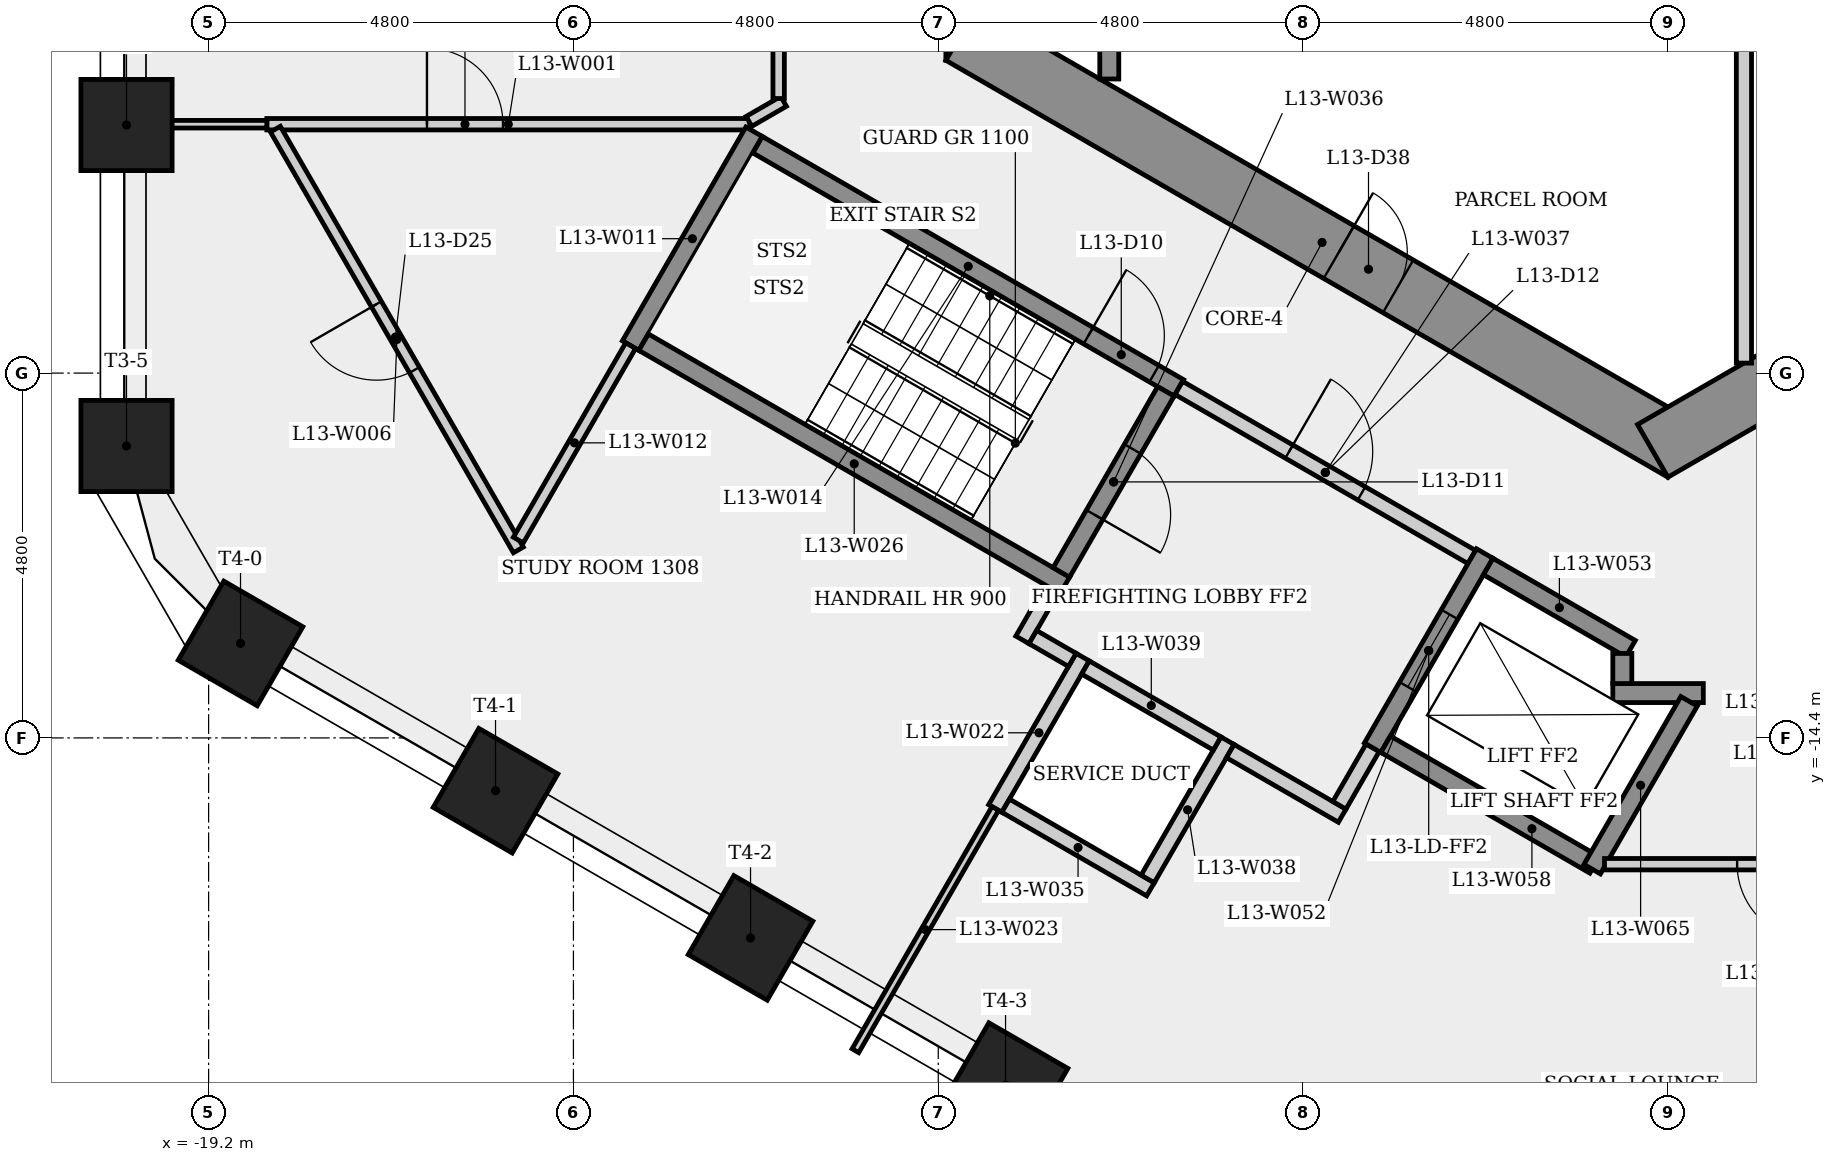
"""IFC4 building model, lengths in metres.
Left out: names, types, materials, properties, quantities, classifications, styles, units other than length and angle.
Written with IfcOpenShell. Run it as: python <this file> out.ifc"""

import sys

from ifc_helpers import new_model, si_unit, direction, frame, frame_2d, origin, origin_2d, place, context, subcontext, project, spatial, rectangle, extrude, element, fill, save


model = new_model("IFC4")
c1 = context("Model", 3, precision=1e-05, world=origin(), true_north=direction((0.0, 1.0)))
c2 = subcontext(c1, "Body", "Model", "MODEL_VIEW")
j1 = project(units=[si_unit("LENGTHUNIT", "METRE"), si_unit("PLANEANGLEUNIT", "RADIAN")], contexts=[c1])
p1 = place(None, origin())
s1 = spatial("IfcSite", under=j1, at=p1, CompositionType="ELEMENT")
p2 = place(p1, origin())
s2 = spatial("IfcBuilding", under=s1, at=p2, CompositionType="ELEMENT")
p3 = place(p2, frame((0.0, 0.0, 52.7)))
s3 = spatial("IfcBuildingStorey", under=s2, at=p3, CompositionType="ELEMENT", Elevation=52.7)
p4 = place(p3, frame((-9.1, 5.485, 0.0), z_axis=(0.0, 0.0, 1.0), x_axis=(0.0, -1.0, 0.0)))
e1 = element("IfcWall", 1, at=p4, inside=s3, PredefinedType="SHEAR", context=c2, shape_type="SweptSolid", body=[
    extrude(rectangle(XDim=10.97, YDim=0.8, at=frame_2d((5.485, 0.0))), origin(), (0.0, 0.0, 1.0), 3.4),
])
p5 = place(p4, frame((4.685, 0.0, 0.0)))
e2 = element("IfcOpeningElement", 2, at=p5, cuts=e1, PredefinedType="OPENING", context=c2, shape_type="SweptSolid", body=[
    extrude(rectangle(XDim=1.6, YDim=2.1, at=frame_2d((0.8, 1.05))), frame((0.0, 0.41, 0.0), z_axis=(0.0, -1.0, 0.0), x_axis=(1.0, 0.0, 0.0)), (0.0, 0.0, 1.0), 0.82),
])
p6 = place(p3, frame((-9.3, -5.138, 0.0), z_axis=(0.0, 0.0, 1.0), x_axis=(0.866023993627, -0.500002442456, 0.0)))
e3 = element("IfcWall", 3, at=p6, inside=s3, PredefinedType="SHEAR", context=c2, shape_type="SweptSolid", body=[
    extrude(rectangle(XDim=10.97, YDim=0.8, at=frame_2d((5.485, 0.0))), origin(), (0.0, 0.0, 1.0), 3.4),
])
p7 = place(p6, frame((5.74, 0.0, 0.0)))
e4 = element("IfcOpeningElement", 4, at=p7, cuts=e3, PredefinedType="OPENING", context=c2, shape_type="SweptSolid", body=[
    extrude(rectangle(XDim=0.9, YDim=2.1, at=frame_2d((0.45, 1.05))), frame((0.0, 0.41, 0.0), z_axis=(0.0, -1.0, 0.0), x_axis=(1.0, 0.0, 0.0)), (0.0, 0.0, 1.0), 0.82),
])
p8 = place(p3, frame((-0.2, -10.623, 0.0), z_axis=(0.0, 0.0, 1.0), x_axis=(0.866023993627, 0.500002442456, 0.0)))
e5 = element("IfcWall", 5, at=p8, inside=s3, PredefinedType="SHEAR", context=c2, shape_type="SweptSolid", body=[
    extrude(rectangle(XDim=10.97, YDim=0.8, at=frame_2d((5.485, 0.0))), origin(), (0.0, 0.0, 1.0), 3.4),
])
p9 = place(p8, frame((7.224, 0.0, 0.0)))
e6 = element("IfcOpeningElement", 6, at=p9, cuts=e5, PredefinedType="OPENING", context=c2, shape_type="SweptSolid", body=[
    extrude(rectangle(XDim=0.9, YDim=2.1, at=frame_2d((0.45, 1.05))), frame((0.0, 0.41, 0.0), z_axis=(0.0, -1.0, 0.0), x_axis=(1.0, 0.0, 0.0)), (0.0, 0.0, 1.0), 0.82),
])
for number, where, z_axis, x_axis in (
    (7, (-20.28, -6.335, 0.0), (0.0, 0.0, 1.0), (-1.0, 0.0, 0.0)),
    (8, (-20.28, -10.559, 0.0), (0.0, 0.0, 1.0), (-1.0, 0.0, 0.0)),
    (9, (-18.78, -13.157, 0.0), (0.0, 0.0, 1.0), (-0.5, -0.866, 0.0)),
    (10, (-15.425, -15.094, 0.0), (0.0, 0.0, 1.0), (-0.5, -0.866, 0.0)),
    (11, (-12.07, -17.031, 0.0), (0.0, 0.0, 1.0), (-0.5, -0.866, 0.0)),
    (12, (-8.715, -18.969, 0.0), (0.0, 0.0, 1.0), (-0.5, -0.866, 0.0)),
):
    element("IfcColumn", number, at=place(p3, frame(where, z_axis=z_axis, x_axis=x_axis)), inside=s3, PredefinedType="COLUMN", context=c2, shape_type="SweptSolid", body=[
        extrude(rectangle(XDim=1.2, YDim=1.2, at=origin_2d()), origin(), (0.0, 0.0, 1.0), 3.4),
    ])
p10 = place(p3, frame((-18.434, -6.325, 0.0), z_axis=(0.0, 0.0, 1.0), x_axis=(1.0, 0.0, 0.0)))
e13 = element("IfcWall", 13, at=p10, inside=s3, PredefinedType="PARTITIONING", context=c2, shape_type="SweptSolid", body=[
    extrude(rectangle(XDim=6.353, YDim=0.15, at=frame_2d((3.177, 0.0))), origin(), (0.0, 0.0, 1.0), 3.05),
])
p11 = place(p10, frame((2.107, 0.0, 0.0)))
e14 = element("IfcOpeningElement", 14, at=p11, cuts=e13, PredefinedType="OPENING", context=c2, shape_type="SweptSolid", body=[
    extrude(rectangle(XDim=1.0, YDim=2.1, at=frame_2d((0.5, 1.05))), frame((0.0, 0.085, 0.0), z_axis=(0.0, -1.0, 0.0), x_axis=(1.0, 0.0, 0.0)), (0.0, 0.0, 1.0), 0.17),
])
p12 = place(p3, frame((-18.434, -6.325, 0.0), z_axis=(0.0, 0.0, 1.0), x_axis=(-1.0, 0.0, 0.0)))
e15 = element("IfcWall", 15, at=p12, inside=s3, PredefinedType="PARTITIONING", context=c2, shape_type="SweptSolid", body=[
    extrude(rectangle(XDim=1.876, YDim=0.1, at=frame_2d((0.938, 0.0))), origin(), (0.0, 0.0, 1.0), 3.05),
])
p13 = place(p3, frame((-15.125, -11.927, 0.0), z_axis=(0.0, 0.0, 1.0), x_axis=(-0.499995720892, 0.866027874314, 0.0)))
e16 = element("IfcWall", 16, at=p13, inside=s3, PredefinedType="PARTITIONING", context=c2, shape_type="SweptSolid", body=[
    extrude(rectangle(XDim=6.393, YDim=0.15, at=frame_2d((3.197, 0.0))), origin(), (0.0, 0.0, 1.0), 3.05),
])
p14 = place(p13, frame((2.734, 0.0, 0.0)))
e17 = element("IfcOpeningElement", 17, at=p14, cuts=e16, PredefinedType="OPENING", context=c2, shape_type="SweptSolid", body=[
    extrude(rectangle(XDim=1.0, YDim=2.1, at=frame_2d((0.5, 1.05))), frame((0.0, 0.085, 0.0), z_axis=(0.0, -1.0, 0.0), x_axis=(1.0, 0.0, 0.0)), (0.0, 0.0, 1.0), 0.17),
])
p15 = place(p3, frame((-13.648, -9.239, 0.0), z_axis=(0.0, 0.0, 1.0), x_axis=(0.500017246033, 0.866015446554, 0.0)))
e18 = element("IfcWall", 18, at=p15, inside=s3, PredefinedType="SHEAR", context=c2, shape_type="SweptSolid", body=[
    extrude(rectangle(XDim=3.25, YDim=0.25, at=frame_2d((1.625, 0.0))), origin(), (0.0, 0.0, 1.0), 3.05),
])
p16 = place(p3, frame((-13.648, -9.239, 0.0), z_axis=(0.0, 0.0, 1.0), x_axis=(-0.500032473623, -0.866006654318, 0.0)))
e19 = element("IfcWall", 19, at=p16, inside=s3, PredefinedType="PARTITIONING", context=c2, shape_type="SweptSolid", body=[
    extrude(rectangle(XDim=2.954, YDim=0.15, at=frame_2d((1.477, 0.0))), origin(), (0.0, 0.0, 1.0), 3.05),
])
p17 = place(p3, frame((-12.091, -6.288, 0.0), z_axis=(0.0, 0.0, 1.0), x_axis=(0.866208757248, 0.499682287925, 0.0)))
e20 = element("IfcWall", 20, at=p17, inside=s3, PredefinedType="PARTITIONING", context=c2, shape_type="SweptSolid", body=[
    extrude(rectangle(XDim=0.526, YDim=0.15, at=frame_2d((0.263, 0.0))), origin(), (0.0, 0.0, 1.0), 3.05),
])
p18 = place(p3, frame((-11.977, -6.595, 0.0), z_axis=(0.0, 0.0, 1.0), x_axis=(0.866025499775, -0.499999833739, 0.0)))
e21 = element("IfcWall", 21, at=p18, inside=s3, PredefinedType="SHEAR", context=c2, shape_type="SweptSolid", body=[
    extrude(rectangle(XDim=6.4, YDim=0.25, at=frame_2d((3.2, 0.0))), origin(), (0.0, 0.0, 1.0), 3.05),
])
p19 = place(p18, frame((5.025, 0.0, 0.0)))
e22 = element("IfcOpeningElement", 22, at=p19, cuts=e21, PredefinedType="OPENING", context=c2, shape_type="SweptSolid", body=[
    extrude(rectangle(XDim=1.0, YDim=2.1, at=frame_2d((0.5, 1.05))), frame((0.0, 0.135, 0.0), z_axis=(0.0, -1.0, 0.0), x_axis=(1.0, 0.0, 0.0)), (0.0, 0.0, 1.0), 0.27),
])
p20 = place(p3, frame((-11.7, 6.137, 0.0), z_axis=(0.0, 0.0, 1.0), x_axis=(0.0, -1.0, 0.0)))
e23 = element("IfcWall", 23, at=p20, inside=s3, PredefinedType="PARTITIONING", context=c2, shape_type="SweptSolid", body=[
    extrude(rectangle(XDim=12.125, YDim=0.15, at=frame_2d((6.062, 0.0))), origin(), (0.0, 0.0, 1.0), 3.05),
])
p21 = place(p20, frame((5.637, 0.0, 0.0)))
e24 = element("IfcOpeningElement", 24, at=p21, cuts=e23, PredefinedType="OPENING", context=c2, shape_type="SweptSolid", body=[
    extrude(rectangle(XDim=1.0, YDim=2.1, at=frame_2d((0.5, 1.05))), frame((0.0, 0.085, 0.0), z_axis=(0.0, -1.0, 0.0), x_axis=(1.0, 0.0, 0.0)), (0.0, 0.0, 1.0), 0.17),
])
p22 = place(p3, frame((-8.85, -15.329, 0.0), z_axis=(0.0, 0.0, 1.0), x_axis=(0.500077740698, 0.865980515519, 0.0)))
e25 = element("IfcWall", 25, at=p22, inside=s3, PredefinedType="PLUMBINGWALL", context=c2, shape_type="SweptSolid", body=[
    extrude(rectangle(XDim=2.3, YDim=0.2, at=frame_2d((1.15, 0.0))), origin(), (0.0, 0.0, 1.0), 3.05),
])
p23 = place(p3, frame((-8.85, -15.329, 0.0), z_axis=(0.0, 0.0, 1.0), x_axis=(-0.499955964762, -0.866050826049, 0.0)))
e26 = element("IfcWall", 26, at=p23, inside=s3, PredefinedType="PARTITIONING", context=c2, shape_type="SweptSolid", body=[
    extrude(rectangle(XDim=3.68, YDim=0.1, at=frame_2d((1.84, 0.0))), origin(), (0.0, 0.0, 1.0), 3.05),
])
p24 = place(p3, frame((-8.493, -13.11, 0.0), z_axis=(0.0, 0.0, 1.0), x_axis=(0.500067724834, 0.865986299303, 0.0)))
e27 = element("IfcWall", 27, at=p24, inside=s3, PredefinedType="PARTITIONING", context=c2, shape_type="SweptSolid", body=[
    extrude(rectangle(XDim=0.775, YDim=0.2, at=frame_2d((0.388, 0.0))), origin(), (0.0, 0.0, 1.0), 3.05),
])
p25 = place(p3, frame((-7.935, -12.393, 0.0), z_axis=(0.0, 0.0, 1.0), x_axis=(-0.866025499775, 0.499999833739, 0.0)))
e28 = element("IfcWall", 28, at=p25, inside=s3, PredefinedType="SHEAR", context=c2, shape_type="SweptSolid", body=[
    extrude(rectangle(XDim=6.4, YDim=0.25, at=frame_2d((3.2, 0.0))), origin(), (0.0, 0.0, 1.0), 3.05),
])
p26 = place(p3, frame((-7.836, -13.373, 0.0), z_axis=(0.0, 0.0, 1.0), x_axis=(-0.866232998003, 0.499640263761, 0.0)))
e29 = element("IfcWall", 29, at=p26, inside=s3, PredefinedType="PARTITIONING", context=c2, shape_type="SweptSolid", body=[
    extrude(rectangle(XDim=0.6, YDim=0.2, at=frame_2d((0.3, 0.0))), origin(), (0.0, 0.0, 1.0), 3.05),
])
p27 = place(p3, frame((-7.35, -5.73, 0.0), z_axis=(0.0, 0.0, 1.0), x_axis=(0.0, 1.0, 0.0)))
e30 = element("IfcWall", 30, at=p27, inside=s3, PredefinedType="SHEAR", context=c2, shape_type="SweptSolid", body=[
    extrude(rectangle(XDim=4.055, YDim=0.25, at=frame_2d((2.028, 0.0))), origin(), (0.0, 0.0, 1.0), 3.05),
])
p28 = place(p3, frame((-6.808, -16.392, 0.0), z_axis=(0.0, 0.0, 1.0), x_axis=(-0.866008176907, 0.50002983664, 0.0)))
e31 = element("IfcWall", 31, at=p28, inside=s3, PredefinedType="PLUMBINGWALL", context=c2, shape_type="SweptSolid", body=[
    extrude(rectangle(XDim=2.2, YDim=0.2, at=frame_2d((1.1, 0.0))), origin(), (0.0, 0.0, 1.0), 3.05),
])
p29 = place(p3, frame((-6.605, -9.841, 0.0), z_axis=(0.0, 0.0, 1.0), x_axis=(-0.499996545922, -0.866027397988, 0.0)))
e32 = element("IfcWall", 32, at=p29, inside=s3, PredefinedType="SHEAR", context=c2, shape_type="SweptSolid", body=[
    extrude(rectangle(XDim=2.75, YDim=0.25, at=frame_2d((1.375, 0.0))), origin(), (0.0, 0.0, 1.0), 3.05),
])
p30 = place(p29, frame((0.875, 0.0, 0.0)))
e33 = element("IfcOpeningElement", 33, at=p30, cuts=e32, PredefinedType="OPENING", context=c2, shape_type="SweptSolid", body=[
    extrude(rectangle(XDim=1.0, YDim=2.1, at=frame_2d((0.5, 1.05))), frame((0.0, 0.135, 0.0), z_axis=(0.0, -1.0, 0.0), x_axis=(1.0, 0.0, 0.0)), (0.0, 0.0, 1.0), 0.27),
])
p31 = place(p3, frame((-6.435, -9.795, 0.0), z_axis=(0.0, 0.0, 1.0), x_axis=(0.866012907634, -0.500021643343, 0.0)))
e34 = element("IfcWall", 34, at=p31, inside=s3, PredefinedType="PARTITIONING", context=c2, shape_type="SweptSolid", body=[
    extrude(rectangle(XDim=4.45, YDim=0.2, at=frame_2d((2.225, 0.0))), origin(), (0.0, 0.0, 1.0), 3.05),
])
p32 = place(p31, frame((1.675, 0.0, 0.0)))
e35 = element("IfcOpeningElement", 35, at=p32, cuts=e34, PredefinedType="OPENING", context=c2, shape_type="SweptSolid", body=[
    extrude(rectangle(XDim=1.1, YDim=2.1, at=frame_2d((0.55, 1.05))), frame((0.0, 0.11, 0.0), z_axis=(0.0, -1.0, 0.0), x_axis=(1.0, 0.0, 0.0)), (0.0, 0.0, 1.0), 0.22),
])
p33 = place(p3, frame((-5.795, -14.437, 0.0), z_axis=(0.0, 0.0, 1.0), x_axis=(-0.500027713859, -0.866009402589, 0.0)))
e36 = element("IfcWall", 36, at=p33, inside=s3, PredefinedType="PLUMBINGWALL", context=c2, shape_type="SweptSolid", body=[
    extrude(rectangle(XDim=2.1, YDim=0.2, at=frame_2d((1.05, 0.0))), origin(), (0.0, 0.0, 1.0), 3.05),
])
p34 = place(p3, frame((-5.931, -14.473, 0.0), z_axis=(0.0, 0.0, 1.0), x_axis=(-0.866041268327, 0.499972520799, 0.0)))
e37 = element("IfcWall", 37, at=p34, inside=s3, PredefinedType="PLUMBINGWALL", context=c2, shape_type="SweptSolid", body=[
    extrude(rectangle(XDim=2.0, YDim=0.2, at=frame_2d((1.0, 0.0))), origin(), (0.0, 0.0, 1.0), 3.05),
])
p35 = place(p3, frame((-4.286, -15.423, 0.0), z_axis=(0.0, 0.0, 1.0), x_axis=(-0.866025371046, 0.500000056704, 0.0)))
e38 = element("IfcWall", 38, at=p35, inside=s3, PredefinedType="PARTITIONING", context=c2, shape_type="SweptSolid", body=[
    extrude(rectangle(XDim=1.7, YDim=0.2, at=frame_2d((0.85, 0.0))), origin(), (0.0, 0.0, 1.0), 3.05),
])
p36 = place(p3, frame((-3.885, -14.529, 0.0), z_axis=(0.0, 0.0, 1.0), x_axis=(-0.499859285417, -0.866106630146, 0.0)))
e39 = element("IfcWall", 39, at=p36, inside=s3, PredefinedType="PARTITIONING", context=c2, shape_type="SweptSolid", body=[
    extrude(rectangle(XDim=0.875, YDim=0.2, at=frame_2d((0.438, 0.0))), origin(), (0.0, 0.0, 1.0), 3.05),
])
p37 = place(p3, frame((-2.41, -11.974, 0.0), z_axis=(0.0, 0.0, 1.0), x_axis=(-0.500001826776, -0.866024349092, 0.0)))
e40 = element("IfcWall", 40, at=p37, inside=s3, PredefinedType="SHEAR", context=c2, shape_type="SweptSolid", body=[
    extrude(rectangle(XDim=2.95, YDim=0.25, at=frame_2d((1.475, 0.0))), origin(), (0.0, 0.0, 1.0), 3.05),
])
p38 = place(p37, frame((0.925, 0.0, 0.0)))
e41 = element("IfcOpeningElement", 41, at=p38, cuts=e40, PredefinedType="OPENING", context=c2, shape_type="SweptSolid", body=[
    extrude(rectangle(XDim=1.1, YDim=2.1, at=frame_2d((0.55, 1.05))), frame((0.0, 0.135, 0.0), z_axis=(0.0, -1.0, 0.0), x_axis=(1.0, 0.0, 0.0)), (0.0, 0.0, 1.0), 0.27),
])
p39 = place(p3, frame((-2.364, -12.145, 0.0), z_axis=(0.0, 0.0, 1.0), x_axis=(0.86603892542, -0.499976579108, 0.0)))
e42 = element("IfcWall", 42, at=p39, inside=s3, PredefinedType="SHEAR", context=c2, shape_type="SweptSolid", body=[
    extrude(rectangle(XDim=2.162, YDim=0.25, at=frame_2d((1.081, 0.0))), origin(), (0.0, 0.0, 1.0), 3.05),
])
p40 = place(p3, frame((-0.965, -16.071, 0.0), z_axis=(0.0, 0.0, 1.0), x_axis=(-0.866029357279, 0.499993152284, 0.0)))
e43 = element("IfcWall", 43, at=p40, inside=s3, PredefinedType="SHEAR", context=c2, shape_type="SweptSolid", body=[
    extrude(rectangle(XDim=3.175, YDim=0.25, at=frame_2d((1.587, 0.0))), origin(), (0.0, 0.0, 1.0), 3.4),
])
p41 = place(p3, frame((-0.725, -13.81, 0.0), z_axis=(0.0, 0.0, 1.0), x_axis=(1.0, 0.0, 0.0)))
e44 = element("IfcWall", 44, at=p41, inside=s3, PredefinedType="SHEAR", context=c2, shape_type="SweptSolid", body=[
    extrude(rectangle(XDim=1.191, YDim=0.25, at=frame_2d((0.595, 0.0))), origin(), (0.0, 0.0, 1.0), 3.05),
])
p42 = place(p3, frame((-0.6, -13.289, 0.0), z_axis=(0.0, 0.0, 1.0), x_axis=(0.0, -1.0, 0.0)))
e45 = element("IfcWall", 45, at=p42, inside=s3, PredefinedType="SHEAR", context=c2, shape_type="SweptSolid", body=[
    extrude(rectangle(XDim=0.396, YDim=0.25, at=frame_2d((0.198, 0.0))), origin(), (0.0, 0.0, 1.0), 3.4),
])
p43 = place(p3, frame((0.278, -13.918, 0.0), z_axis=(0.0, 0.0, 1.0), x_axis=(-0.500020783669, -0.866013403995, 0.0)))
e46 = element("IfcWall", 46, at=p43, inside=s3, PredefinedType="SHEAR", context=c2, shape_type="SweptSolid", body=[
    extrude(rectangle(XDim=2.55, YDim=0.25, at=frame_2d((1.275, 0.0))), origin(), (0.0, 0.0, 1.0), 3.05),
])
p44 = place(p3, frame((1.0, -5.275, 0.0), z_axis=(0.0, 0.0, 1.0), x_axis=(0.0, -1.0, 0.0)))
e47 = element("IfcWall", 47, at=p44, inside=s3, PredefinedType="PARTITIONING", context=c2, shape_type="SweptSolid", body=[
    extrude(rectangle(XDim=4.194, YDim=0.2, at=frame_2d((2.097, 0.0))), origin(), (0.0, 0.0, 1.0), 3.05),
])
p45 = place(p3, frame((3.656, -16.062, 0.0), z_axis=(0.0, 0.0, 1.0), x_axis=(-1.0, 0.0, 0.0)))
e48 = element("IfcWall", 48, at=p45, inside=s3, PredefinedType="PARTITIONING", context=c2, shape_type="SweptSolid", body=[
    extrude(rectangle(XDim=4.49, YDim=0.15, at=frame_2d((2.245, 0.0))), origin(), (0.0, 0.0, 1.0), 3.05),
])
p46 = place(p45, frame((1.745, 0.0, 0.0)))
e49 = element("IfcOpeningElement", 49, at=p46, cuts=e48, PredefinedType="OPENING", context=c2, shape_type="SweptSolid", body=[
    extrude(rectangle(XDim=1.0, YDim=2.1, at=frame_2d((0.5, 1.05))), frame((0.0, 0.085, 0.0), z_axis=(0.0, -1.0, 0.0), x_axis=(1.0, 0.0, 0.0)), (0.0, 0.0, 1.0), 0.17),
])
p47 = place(p19, origin())
e50 = element("IfcDoor", 50, at=p47, inside=s3, OperationType="SINGLE_SWING_LEFT", PredefinedType="DOOR", context=c2, shape_type="SweptSolid", body=[
    extrude(rectangle(XDim=1.0, YDim=2.1, at=frame_2d((0.5, 1.05))), frame((0.0, 0.025, 0.0), z_axis=(0.0, -1.0, 0.0), x_axis=(1.0, 0.0, 0.0)), (0.0, 0.0, 1.0), 0.05),
])
fill(e22, e50)
p48 = place(p30, origin())
e51 = element("IfcDoor", 51, at=p48, inside=s3, OperationType="SINGLE_SWING_RIGHT", PredefinedType="DOOR", context=c2, shape_type="SweptSolid", body=[
    extrude(rectangle(XDim=1.0, YDim=2.1, at=frame_2d((0.5, 1.05))), frame((0.0, 0.025, 0.0), z_axis=(0.0, -1.0, 0.0), x_axis=(1.0, 0.0, 0.0)), (0.0, 0.0, 1.0), 0.05),
])
fill(e33, e51)
p49 = place(p32, origin())
e52 = element("IfcDoor", 52, at=p49, inside=s3, OperationType="SINGLE_SWING_LEFT", PredefinedType="DOOR", context=c2, shape_type="SweptSolid", body=[
    extrude(rectangle(XDim=1.1, YDim=2.1, at=frame_2d((0.55, 1.05))), frame((0.0, 0.025, 0.0), z_axis=(0.0, -1.0, 0.0), x_axis=(1.0, 0.0, 0.0)), (0.0, 0.0, 1.0), 0.05),
])
fill(e35, e52)
p50 = place(p38, origin())
e53 = element("IfcDoor", 53, at=p50, inside=s3, OperationType="SLIDING_TO_LEFT", PredefinedType="DOOR", context=c2, shape_type="SweptSolid", body=[
    extrude(rectangle(XDim=1.1, YDim=2.1, at=frame_2d((0.55, 1.05))), frame((0.0, 0.025, 0.0), z_axis=(0.0, -1.0, 0.0), x_axis=(1.0, 0.0, 0.0)), (0.0, 0.0, 1.0), 0.05),
])
fill(e41, e53)
p51 = place(p11, origin())
e54 = element("IfcDoor", 54, at=p51, inside=s3, OperationType="SINGLE_SWING_LEFT", PredefinedType="DOOR", context=c2, shape_type="SweptSolid", body=[
    extrude(rectangle(XDim=1.0, YDim=2.1, at=frame_2d((0.5, 1.05))), frame((0.0, 0.025, 0.0), z_axis=(0.0, -1.0, 0.0), x_axis=(1.0, 0.0, 0.0)), (0.0, 0.0, 1.0), 0.05),
])
fill(e14, e54)
p52 = place(p14, origin())
e55 = element("IfcDoor", 55, at=p52, inside=s3, OperationType="SINGLE_SWING_RIGHT", PredefinedType="DOOR", context=c2, shape_type="SweptSolid", body=[
    extrude(rectangle(XDim=1.0, YDim=2.1, at=frame_2d((0.5, 1.05))), frame((0.0, 0.025, 0.0), z_axis=(0.0, -1.0, 0.0), x_axis=(1.0, 0.0, 0.0)), (0.0, 0.0, 1.0), 0.05),
])
fill(e17, e55)
p53 = place(p46, origin())
e56 = element("IfcDoor", 56, at=p53, inside=s3, OperationType="SINGLE_SWING_LEFT", PredefinedType="DOOR", context=c2, shape_type="SweptSolid", body=[
    extrude(rectangle(XDim=1.0, YDim=2.1, at=frame_2d((0.5, 1.05))), frame((0.0, 0.025, 0.0), z_axis=(0.0, -1.0, 0.0), x_axis=(1.0, 0.0, 0.0)), (0.0, 0.0, 1.0), 0.05),
])
fill(e49, e56)
p54 = place(p7, origin())
e57 = element("IfcDoor", 57, at=p54, inside=s3, OperationType="SINGLE_SWING_LEFT", PredefinedType="DOOR", context=c2, shape_type="SweptSolid", body=[
    extrude(rectangle(XDim=0.9, YDim=2.1, at=frame_2d((0.45, 1.05))), frame((0.0, 0.025, 0.0), z_axis=(0.0, -1.0, 0.0), x_axis=(1.0, 0.0, 0.0)), (0.0, 0.0, 1.0), 0.05),
])
fill(e4, e57)
save(model, sys.argv[1])
